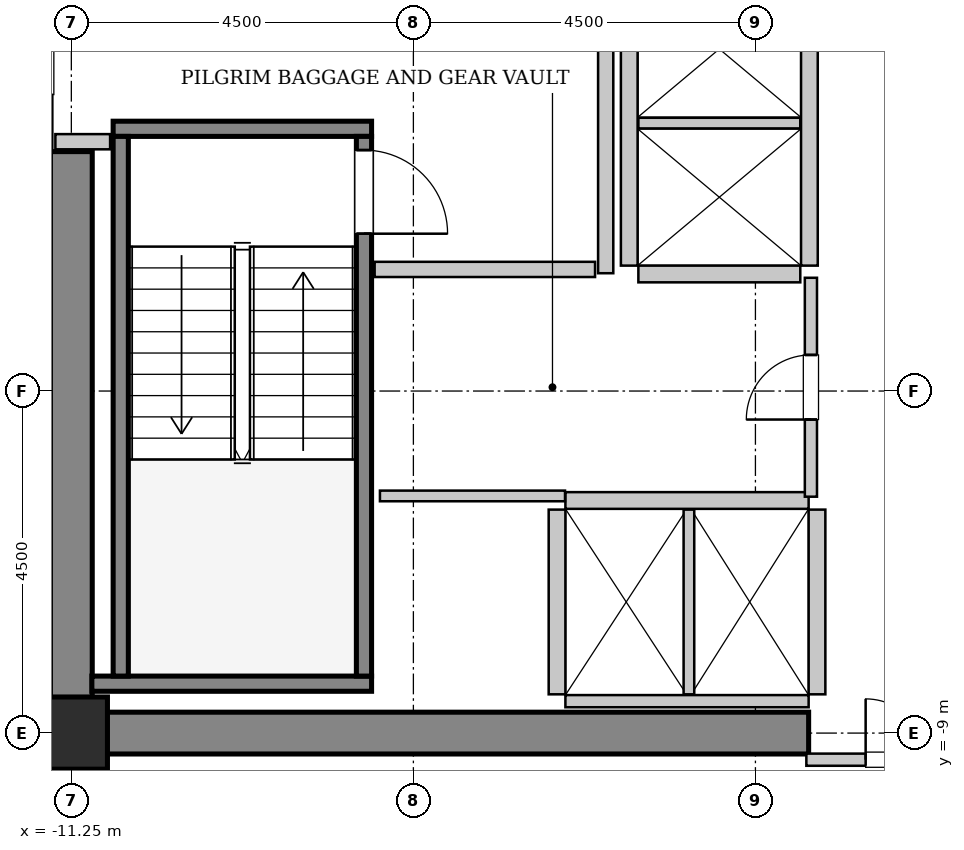
"""IFC4 building model, lengths in metres.
Left out: names, types, materials, properties, quantities, classifications, styles, units other than length and angle.
Written with IfcOpenShell. Run it as: python <this file> out.ifc"""

import sys

from ifc_helpers import new_model, si_unit, direction, frame, frame_2d, origin, origin_2d, place, context, subcontext, project, spatial, rectangle, hollow_rectangle, extrude, source, transform, mapped, element, fill, save


model = new_model("IFC4")
c1 = context("Model", 3, precision=1e-05, world=origin(), true_north=direction((0.0, 1.0)))
c2 = subcontext(c1, "Body", "Model", "MODEL_VIEW")
j1 = project(units=[si_unit("LENGTHUNIT", "METRE"), si_unit("PLANEANGLEUNIT", "RADIAN")], contexts=[c1])
p1 = place(None, origin())
s1 = spatial("IfcSite", under=j1, at=p1, CompositionType="ELEMENT")
p2 = place(p1, origin())
s2 = spatial("IfcBuilding", under=s1, at=p2, CompositionType="ELEMENT")
p3 = place(p2, frame((0.0, 0.0, 102.2)))
s3 = spatial("IfcBuildingStorey", under=s2, at=p3, CompositionType="ELEMENT", Elevation=102.2)
m1 = source(origin(), c2, "Body", "SweptSolid", [
    extrude(rectangle(XDim=9.975, YDim=0.55, at=frame_2d((4.987, 0.0))), origin(), (0.0, 0.0, 1.0), 3.8),
])
p4 = place(p3, frame((-11.525, -9.0, 0.0), z_axis=(0.0, 0.0, 1.0), x_axis=(1.0, 0.0, 0.0)))
e1 = element("IfcWall", 1, at=p4, inside=s3, PredefinedType="SHEAR", context=c2, shape_type="MappedRepresentation", body=[
    mapped(m1, transform((0.0, 0.0, 0.0), x_axis=(1.0, 0.0, 0.0), y_axis=(0.0, 1.0, 0.0), z_axis=(0.0, 0.0, 1.0), scale=1.0)),
])
m2 = source(origin(), c2, "Body", "SweptSolid", [
    extrude(rectangle(XDim=7.375, YDim=0.55, at=frame_2d((3.688, 0.0))), origin(), (0.0, 0.0, 1.0), 3.8),
])
p5 = place(p3, frame((-11.25, -8.725, 0.0), z_axis=(0.0, 0.0, 1.0), x_axis=(0.0, 1.0, 0.0)))
e2 = element("IfcWall", 2, at=p5, inside=s3, PredefinedType="SHEAR", context=c2, shape_type="MappedRepresentation", body=[
    mapped(m2, transform((0.0, 0.0, 0.0), x_axis=(1.0, 0.0, 0.0), y_axis=(0.0, 1.0, 0.0), z_axis=(0.0, 0.0, 1.0), scale=1.0)),
])
m3 = source(origin(), c2, "Body", "SweptSolid", [
    extrude(hollow_rectangle(XDim=0.95, YDim=0.95, WallThickness=0.045, InnerFilletRadius=0.045, OuterFilletRadius=0.09, at=origin_2d()), origin(), (0.0, 0.0, 1.0), 3.8),
])
p6 = place(p3, frame((-11.25, -9.0, 0.0), z_axis=(0.0, 0.0, 1.0), x_axis=(1.0, 0.0, 0.0)))
e3 = element("IfcColumn", 3, at=p6, inside=s3, PredefinedType="COLUMN", context=c2, shape_type="MappedRepresentation", body=[
    mapped(m3, transform((0.0, 0.0, 0.0), x_axis=(1.0, 0.0, 0.0), y_axis=(0.0, 1.0, 0.0), z_axis=(0.0, 0.0, 1.0), scale=1.0)),
])
m4 = source(origin(), c2, "Body", "SweptSolid", [
    extrude(rectangle(XDim=3.4, YDim=0.2, at=frame_2d((1.7, 0.0))), origin(), (0.0, 0.0, 1.0), 3.8),
])
p7 = place(p3, frame((-10.7, -1.05, 0.0), z_axis=(0.0, 0.0, 1.0), x_axis=(1.0, 0.0, 0.0)))
e4 = element("IfcWall", 4, at=p7, inside=s3, PredefinedType="SOLIDWALL", context=c2, shape_type="MappedRepresentation", body=[
    mapped(m4, transform((0.0, 0.0, 0.0), x_axis=(1.0, 0.0, 0.0), y_axis=(0.0, 1.0, 0.0), z_axis=(0.0, 0.0, 1.0), scale=1.0)),
])
m5 = source(origin(), c2, "Body", "SweptSolid", [
    extrude(rectangle(XDim=3.68, YDim=0.2, at=frame_2d((1.84, 0.0))), origin(), (0.0, 0.0, 1.0), 3.8),
])
p8 = place(p3, frame((-10.98, -8.35, 0.0), z_axis=(0.0, 0.0, 1.0), x_axis=(1.0, 0.0, 0.0)))
e5 = element("IfcWall", 5, at=p8, inside=s3, PredefinedType="SOLIDWALL", context=c2, shape_type="MappedRepresentation", body=[
    mapped(m5, transform((0.0, 0.0, 0.0), x_axis=(1.0, 0.0, 0.0), y_axis=(0.0, 1.0, 0.0), z_axis=(0.0, 0.0, 1.0), scale=1.0)),
])
m6 = source(origin(), c2, "Body", "SweptSolid", [
    extrude(rectangle(XDim=7.1, YDim=0.2, at=frame_2d((3.55, 0.0))), origin(), (0.0, 0.0, 1.0), 3.8),
])
p9 = place(p3, frame((-10.6, -1.15, 0.0), z_axis=(0.0, 0.0, 1.0), x_axis=(0.0, -1.0, 0.0)))
e6 = element("IfcWall", 6, at=p9, inside=s3, PredefinedType="SOLIDWALL", context=c2, shape_type="MappedRepresentation", body=[
    mapped(m6, transform((0.0, 0.0, 0.0), x_axis=(1.0, 0.0, 0.0), y_axis=(0.0, 1.0, 0.0), z_axis=(0.0, 0.0, 1.0), scale=1.0)),
])
p10 = place(p3, frame((-7.4, -1.15, 0.0), z_axis=(0.0, 0.0, 1.0), x_axis=(0.0, -1.0, 0.0)))
e7 = element("IfcWall", 7, at=p10, inside=s3, PredefinedType="SOLIDWALL", context=c2, shape_type="MappedRepresentation", body=[
    mapped(m6, transform((0.0, 0.0, 0.0), x_axis=(1.0, 0.0, 0.0), y_axis=(0.0, 1.0, 0.0), z_axis=(0.0, 0.0, 1.0), scale=1.0)),
])
p11 = place(p10, frame((0.18, 0.0, 0.0)))
e8 = element("IfcOpeningElement", 8, at=p11, cuts=e7, PredefinedType="OPENING", context=c2, shape_type="SweptSolid", body=[
    extrude(rectangle(XDim=1.1, YDim=2.15, at=frame_2d((0.55, 1.075))), frame((0.0, 0.11, 0.0), z_axis=(0.0, -1.0, 0.0), x_axis=(1.0, 0.0, 0.0)), (0.0, 0.0, 1.0), 0.22),
])
m7 = source(origin(), c2, "Body", "SweptSolid", [
    extrude(rectangle(XDim=3.2, YDim=0.22, at=frame_2d((1.6, 0.0))), origin(), (0.0, 0.0, 1.0), 3.535),
])
p12 = place(p3, frame((-1.55, -5.94, 0.0), z_axis=(0.0, 0.0, 1.0), x_axis=(-1.0, 0.0, 0.0)))
e9 = element("IfcWall", 9, at=p12, inside=s3, PredefinedType="SOLIDWALL", context=c2, shape_type="MappedRepresentation", body=[
    mapped(m7, transform((0.0, 0.0, 0.0), x_axis=(1.0, 0.0, 0.0), y_axis=(0.0, 1.0, 0.0), z_axis=(0.0, 0.0, 1.0), scale=1.0)),
])
m8 = source(origin(), c2, "Body", "SweptSolid", [
    extrude(rectangle(XDim=3.2, YDim=0.16, at=frame_2d((1.6, 0.0))), origin(), (0.0, 0.0, 1.0), 2.425),
])
p13 = place(p3, frame((-4.75, -8.58, 0.0), z_axis=(0.0, 0.0, 1.0), x_axis=(1.0, 0.0, 0.0)))
e10 = element("IfcWall", 10, at=p13, inside=s3, PredefinedType="PARTITIONING", context=c2, shape_type="MappedRepresentation", body=[
    mapped(m8, transform((0.0, 0.0, 0.0), x_axis=(1.0, 0.0, 0.0), y_axis=(0.0, 1.0, 0.0), z_axis=(0.0, 0.0, 1.0), scale=1.0)),
])
m9 = source(origin(), c2, "Body", "SweptSolid", [
    extrude(rectangle(XDim=2.43, YDim=0.22, at=frame_2d((1.215, 0.0))), origin(), (0.0, 0.0, 1.0), 3.535),
])
p14 = place(p3, frame((-4.86, -6.06, 0.0), z_axis=(0.0, 0.0, 1.0), x_axis=(0.0, -1.0, 0.0)))
e11 = element("IfcWall", 11, at=p14, inside=s3, PredefinedType="SOLIDWALL", context=c2, shape_type="MappedRepresentation", body=[
    mapped(m9, transform((0.0, 0.0, 0.0), x_axis=(1.0, 0.0, 0.0), y_axis=(0.0, 1.0, 0.0), z_axis=(0.0, 0.0, 1.0), scale=1.0)),
])
m10 = source(origin(), c2, "Body", "SweptSolid", [
    extrude(rectangle(XDim=2.43, YDim=0.14, at=frame_2d((1.215, 0.0))), origin(), (0.0, 0.0, 1.0), 3.535),
])
p15 = place(p3, frame((-3.125, -8.49, 0.0), z_axis=(0.0, 0.0, 1.0), x_axis=(0.0, 1.0, 0.0)))
e12 = element("IfcWall", 12, at=p15, inside=s3, PredefinedType="PARTITIONING", context=c2, shape_type="MappedRepresentation", body=[
    mapped(m10, transform((0.0, 0.0, 0.0), x_axis=(1.0, 0.0, 0.0), y_axis=(0.0, 1.0, 0.0), z_axis=(0.0, 0.0, 1.0), scale=1.0)),
])
p16 = place(p3, frame((-1.44, -8.49, 0.0), z_axis=(0.0, 0.0, 1.0), x_axis=(0.0, 1.0, 0.0)))
e13 = element("IfcWall", 13, at=p16, inside=s3, PredefinedType="SOLIDWALL", context=c2, shape_type="MappedRepresentation", body=[
    mapped(m9, transform((0.0, 0.0, 0.0), x_axis=(1.0, 0.0, 0.0), y_axis=(0.0, 1.0, 0.0), z_axis=(0.0, 0.0, 1.0), scale=1.0)),
])
m11 = source(origin(), c2, "Body", "SweptSolid", [
    extrude(rectangle(XDim=5.7, YDim=0.22, at=frame_2d((2.85, 0.0))), origin(), (0.0, 0.0, 1.0), 3.535),
])
for number, where, z_axis, x_axis in (
    (14, (-1.54, -2.85, 0.0), (0.0, 0.0, 1.0), (0.0, 1.0, 0.0)),
    (15, (-3.91, 2.85, 0.0), (0.0, 0.0, 1.0), (0.0, -1.0, 0.0)),
):
    element("IfcWall", number, at=place(p3, frame(where, z_axis=z_axis, x_axis=x_axis)), inside=s3, PredefinedType="SOLIDWALL", context=c2, shape_type="MappedRepresentation", body=[
        mapped(m11, transform((0.0, 0.0, 0.0), x_axis=(1.0, 0.0, 0.0), y_axis=(0.0, 1.0, 0.0), z_axis=(0.0, 0.0, 1.0), scale=1.0)),
    ])
m12 = source(origin(), c2, "Body", "SweptSolid", [
    extrude(rectangle(XDim=2.13, YDim=0.22, at=frame_2d((1.065, 0.0))), origin(), (0.0, 0.0, 1.0), 3.535),
])
p17 = place(p3, frame((-3.79, -2.96, 0.0), z_axis=(0.0, 0.0, 1.0), x_axis=(1.0, 0.0, 0.0)))
e16 = element("IfcWall", 16, at=p17, inside=s3, PredefinedType="SOLIDWALL", context=c2, shape_type="MappedRepresentation", body=[
    mapped(m12, transform((0.0, 0.0, 0.0), x_axis=(1.0, 0.0, 0.0), y_axis=(0.0, 1.0, 0.0), z_axis=(0.0, 0.0, 1.0), scale=1.0)),
])
m13 = source(origin(), c2, "Body", "SweptSolid", [
    extrude(rectangle(XDim=2.13, YDim=0.14, at=frame_2d((1.065, 0.0))), origin(), (0.0, 0.0, 1.0), 3.535),
])
p18 = place(p3, frame((-3.79, -0.975, 0.0), z_axis=(0.0, 0.0, 1.0), x_axis=(1.0, 0.0, 0.0)))
e17 = element("IfcWall", 17, at=p18, inside=s3, PredefinedType="PARTITIONING", context=c2, shape_type="MappedRepresentation", body=[
    mapped(m13, transform((0.0, 0.0, 0.0), x_axis=(1.0, 0.0, 0.0), y_axis=(0.0, 1.0, 0.0), z_axis=(0.0, 0.0, 1.0), scale=1.0)),
])
m14 = source(origin(), c2, "Body", "SweptSolid", [
    extrude(rectangle(XDim=5.9, YDim=0.2, at=frame_2d((2.95, 0.0))), origin(), (0.0, 0.0, 1.0), 3.535),
])
p19 = place(p3, frame((-4.22, -2.95, 0.0), z_axis=(0.0, 0.0, 1.0), x_axis=(0.0, 1.0, 0.0)))
e18 = element("IfcWall", 18, at=p19, inside=s3, PredefinedType="PARTITIONING", context=c2, shape_type="MappedRepresentation", body=[
    mapped(m14, transform((0.0, 0.0, 0.0), x_axis=(1.0, 0.0, 0.0), y_axis=(0.0, 1.0, 0.0), z_axis=(0.0, 0.0, 1.0), scale=1.0)),
])
m15 = source(origin(), c2, "Body", "SweptSolid", [
    extrude(rectangle(XDim=2.9, YDim=0.2, at=frame_2d((1.45, 0.0))), origin(), (0.0, 0.0, 1.0), 3.535),
])
p20 = place(p3, frame((-7.26, -2.9, 0.0), z_axis=(0.0, 0.0, 1.0), x_axis=(1.0, 0.0, 0.0)))
e19 = element("IfcWall", 19, at=p20, inside=s3, PredefinedType="PARTITIONING", context=c2, shape_type="MappedRepresentation", body=[
    mapped(m15, transform((0.0, 0.0, 0.0), x_axis=(1.0, 0.0, 0.0), y_axis=(0.0, 1.0, 0.0), z_axis=(0.0, 0.0, 1.0), scale=1.0)),
])
m16 = source(origin(), c2, "Body", "SweptSolid", [
    extrude(rectangle(XDim=0.72, YDim=0.2, at=frame_2d((0.36, 0.0))), origin(), (0.0, 0.0, 1.0), 3.535),
])
p21 = place(p3, frame((-11.46, -1.22, 0.0), z_axis=(0.0, 0.0, 1.0), x_axis=(1.0, 0.0, 0.0)))
e20 = element("IfcWall", 20, at=p21, inside=s3, PredefinedType="PARTITIONING", context=c2, shape_type="MappedRepresentation", body=[
    mapped(m16, transform((0.0, 0.0, 0.0), x_axis=(1.0, 0.0, 0.0), y_axis=(0.0, 1.0, 0.0), z_axis=(0.0, 0.0, 1.0), scale=1.0)),
])
m17 = source(origin(), c2, "Body", "SweptSolid", [
    extrude(rectangle(XDim=3.16, YDim=0.16, at=frame_2d((1.58, 0.0))), origin(), (0.0, 0.0, 1.0), 2.425),
])
p22 = place(p3, frame((-1.58, -9.35, 0.0), z_axis=(0.0, 0.0, 1.0), x_axis=(1.0, 0.0, 0.0)))
e21 = element("IfcWall", 21, at=p22, inside=s3, PredefinedType="PARTITIONING", context=c2, shape_type="MappedRepresentation", body=[
    mapped(m17, transform((0.0, 0.0, 0.0), x_axis=(1.0, 0.0, 0.0), y_axis=(0.0, 1.0, 0.0), z_axis=(0.0, 0.0, 1.0), scale=1.0)),
])
p23 = place(p22, frame((0.78, 0.0, 0.0)))
e22 = element("IfcOpeningElement", 22, at=p23, cuts=e21, PredefinedType="OPENING", context=c2, shape_type="SweptSolid", body=[
    extrude(rectangle(XDim=1.6, YDim=2.3, at=frame_2d((0.8, 1.15))), frame((0.0, 0.09, 0.0), z_axis=(0.0, -1.0, 0.0), x_axis=(1.0, 0.0, 0.0)), (0.0, 0.0, 1.0), 0.18),
])
m18 = source(origin(), c2, "Body", "SweptSolid", [
    extrude(rectangle(XDim=2.88, YDim=0.16, at=frame_2d((1.44, 0.0))), origin(), (0.0, 0.0, 1.0), 3.535),
])
p24 = place(p3, frame((-1.52, -5.89, 0.0), z_axis=(0.0, 0.0, 1.0), x_axis=(0.0, 1.0, 0.0)))
e23 = element("IfcWall", 23, at=p24, inside=s3, PredefinedType="PARTITIONING", context=c2, shape_type="MappedRepresentation", body=[
    mapped(m18, transform((0.0, 0.0, 0.0), x_axis=(1.0, 0.0, 0.0), y_axis=(0.0, 1.0, 0.0), z_axis=(0.0, 0.0, 1.0), scale=1.0)),
])
p25 = place(p24, frame((1.015, 0.0, 0.0)))
e24 = element("IfcOpeningElement", 24, at=p25, cuts=e23, PredefinedType="OPENING", context=c2, shape_type="SweptSolid", body=[
    extrude(rectangle(XDim=0.85, YDim=2.1, at=frame_2d((0.425, 1.05))), frame((0.0, 0.09, 0.0), z_axis=(0.0, -1.0, 0.0), x_axis=(1.0, 0.0, 0.0)), (0.0, 0.0, 1.0), 0.18),
])
m19 = source(origin(), c2, "Body", "SweptSolid", [
    extrude(rectangle(XDim=2.435, YDim=0.14, at=frame_2d((1.218, 0.0))), origin(), (0.0, 0.0, 1.0), 3.535),
])
p26 = place(p3, frame((-7.19, -5.88, 0.0), z_axis=(0.0, 0.0, 1.0), x_axis=(1.0, 0.0, 0.0)))
e25 = element("IfcWall", 25, at=p26, inside=s3, PredefinedType="PARTITIONING", context=c2, shape_type="MappedRepresentation", body=[
    mapped(m19, transform((0.0, 0.0, 0.0), x_axis=(1.0, 0.0, 0.0), y_axis=(0.0, 1.0, 0.0), z_axis=(0.0, 0.0, 1.0), scale=1.0)),
])
m20 = source(origin(), c2, "Body", "SweptSolid", [
    extrude(rectangle(XDim=1.1, YDim=2.15, at=frame_2d((0.55, 1.075))), frame((0.0, 0.025, 0.0), z_axis=(0.0, -1.0, 0.0), x_axis=(1.0, 0.0, 0.0)), (0.0, 0.0, 1.0), 0.05),
])
p27 = place(p11, origin())
e26 = element("IfcDoor", 26, at=p27, inside=s3, OperationType="SINGLE_SWING_RIGHT", PredefinedType="DOOR", context=c2, shape_type="MappedRepresentation", body=[
    mapped(m20, transform((0.0, 0.0, 0.0), x_axis=(1.0, 0.0, 0.0), y_axis=(0.0, 1.0, 0.0), z_axis=(0.0, 0.0, 1.0), scale=1.0)),
])
fill(e8, e26)
m21 = source(origin(), c2, "Body", "SweptSolid", [
    extrude(rectangle(XDim=1.6, YDim=2.3, at=frame_2d((0.8, 1.15))), frame((0.0, 0.025, 0.0), z_axis=(0.0, -1.0, 0.0), x_axis=(1.0, 0.0, 0.0)), (0.0, 0.0, 1.0), 0.05),
])
p28 = place(p23, origin())
e27 = element("IfcDoor", 27, at=p28, inside=s3, OperationType="DOUBLE_DOOR_SINGLE_SWING", PredefinedType="DOOR", context=c2, shape_type="MappedRepresentation", body=[
    mapped(m21, transform((0.0, 0.0, 0.0), x_axis=(1.0, 0.0, 0.0), y_axis=(0.0, 1.0, 0.0), z_axis=(0.0, 0.0, 1.0), scale=1.0)),
])
fill(e22, e27)
m22 = source(origin(), c2, "Body", "SweptSolid", [
    extrude(rectangle(XDim=0.85, YDim=2.1, at=frame_2d((0.425, 1.05))), frame((0.0, 0.025, 0.0), z_axis=(0.0, -1.0, 0.0), x_axis=(1.0, 0.0, 0.0)), (0.0, 0.0, 1.0), 0.05),
])
p29 = place(p25, origin())
e28 = element("IfcDoor", 28, at=p29, inside=s3, OperationType="SINGLE_SWING_LEFT", PredefinedType="DOOR", context=c2, shape_type="MappedRepresentation", body=[
    mapped(m22, transform((0.0, 0.0, 0.0), x_axis=(1.0, 0.0, 0.0), y_axis=(0.0, 1.0, 0.0), z_axis=(0.0, 0.0, 1.0), scale=1.0)),
])
fill(e24, e28)
save(model, sys.argv[1])
